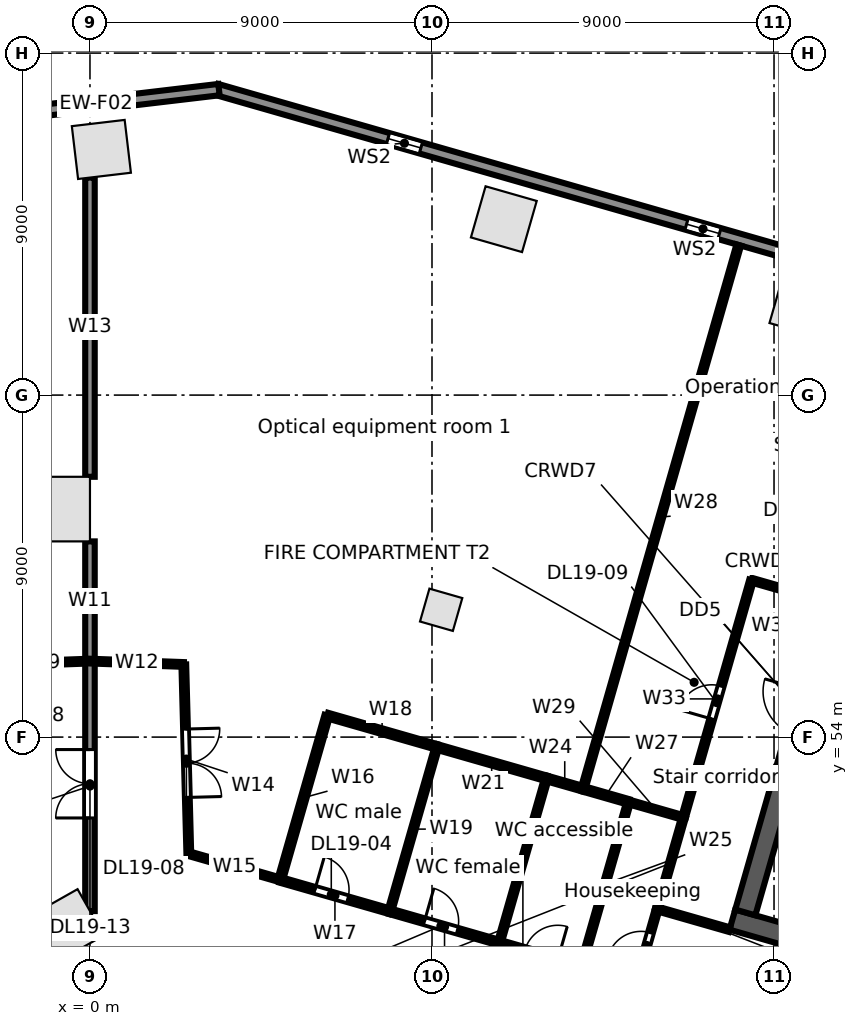
"""IFC4 building model, lengths in metres.
Left out: names, types, materials, properties, quantities, classifications, styles, units other than length and angle.
Written with IfcOpenShell. Run it as: python <this file> out.ifc"""

import sys

from ifc_helpers import new_model, si_unit, direction, frame, frame_2d, origin, origin_2d, place, context, subcontext, project, spatial, rectangle, extrude, element, fill, save


model = new_model("IFC4")
c1 = context("Model", 3, precision=1e-05, world=origin(), true_north=direction((0.0, 1.0)))
c2 = subcontext(c1, "Body", "Model", "MODEL_VIEW")
j1 = project(units=[si_unit("LENGTHUNIT", "METRE"), si_unit("PLANEANGLEUNIT", "RADIAN")], contexts=[c1])
p1 = place(None, origin())
s1 = spatial("IfcSite", under=j1, at=p1, CompositionType="ELEMENT")
p2 = place(p1, origin())
s2 = spatial("IfcBuilding", under=s1, at=p2, CompositionType="ELEMENT")
p3 = place(p2, frame((0.0, 0.0, 97.1)))
s3 = spatial("IfcBuildingStorey", under=s2, at=p3, CompositionType="ELEMENT", Elevation=97.1)
for number, where, z_axis, x_axis in (
    (1, (18.746, 65.376, 0.0), (0.0, 0.0, 1.0), (-0.961, 0.276, 0.0)),
    (2, (10.89, 67.629, 0.0), (0.0, 0.0, 1.0), (-0.961, 0.276, 0.0)),
    (3, (0.3, 69.464, 0.0), (0.0, 0.0, 1.0), (-0.993, -0.118, 0.0)),
    (4, (-0.591, 49.044, 0.0), (0.0, 0.0, 1.0), (0.87, 0.492, 0.0)),
):
    element("IfcColumn", number, at=place(p3, frame(where, z_axis=z_axis, x_axis=x_axis)), inside=s3, PredefinedType="COLUMN", context=c2, shape_type="SweptSolid", body=[
        extrude(rectangle(XDim=1.4, YDim=1.4, at=origin_2d()), origin(), (0.0, 0.0, 1.0), 4.4),
    ])
p4 = place(p3, frame((-0.85, 60.0, 0.0), z_axis=(0.0, 0.0, 1.0), x_axis=(0.0, 1.0, 0.0)))
e5 = element("IfcColumn", 5, at=p4, inside=s3, PredefinedType="COLUMN", context=c2, shape_type="SweptSolid", body=[
    extrude(rectangle(XDim=1.7, YDim=1.7, at=origin_2d()), origin(), (0.0, 0.0, 1.0), 4.4),
])
p5 = place(p3, frame((9.241, 57.35, 0.0), z_axis=(0.0, 0.0, 1.0), x_axis=(0.961261695938, -0.275637355817, 0.0)))
e6 = element("IfcColumn", 6, at=p5, inside=s3, PredefinedType="COLUMN", context=c2, shape_type="SweptSolid", body=[
    extrude(rectangle(XDim=0.9, YDim=0.9, at=origin_2d()), origin(), (0.0, 0.0, 1.0), 4.4),
])
p6 = place(p3, frame((3.335, 71.044, 0.0), z_axis=(0.0, 0.0, 1.0), x_axis=(0.961260130989, -0.275642813387, 0.0)))
e7 = element("IfcWall", 7, at=p6, inside=s3, PredefinedType="STANDARD", context=c2, shape_type="SweptSolid", body=[
    extrude(rectangle(XDim=32.741, YDim=0.3, at=frame_2d((16.371, 0.0))), origin(), (0.0, 0.0, 1.0), 4.08),
])
p7 = place(p6, frame((29.207, 0.0, 0.6)))
e8 = element("IfcOpeningElement", 8, at=p7, cuts=e7, PredefinedType="OPENING", context=c2, shape_type="SweptSolid", body=[
    extrude(rectangle(XDim=0.9, YDim=2.8, at=frame_2d((0.45, 1.4))), frame((0.0, 0.16, 0.0), z_axis=(0.0, -1.0, 0.0), x_axis=(1.0, 0.0, 0.0)), (0.0, 0.0, 1.0), 0.32),
])
p8 = place(p6, frame((21.034, 0.0, 0.6)))
e9 = element("IfcOpeningElement", 9, at=p8, cuts=e7, PredefinedType="OPENING", context=c2, shape_type="SweptSolid", body=[
    extrude(rectangle(XDim=0.9, YDim=2.8, at=frame_2d((0.45, 1.4))), frame((0.0, 0.16, 0.0), z_axis=(0.0, -1.0, 0.0), x_axis=(1.0, 0.0, 0.0)), (0.0, 0.0, 1.0), 0.32),
])
p9 = place(p6, frame((12.861, 0.0, 0.6)))
e10 = element("IfcOpeningElement", 10, at=p9, cuts=e7, PredefinedType="OPENING", context=c2, shape_type="SweptSolid", body=[
    extrude(rectangle(XDim=0.9, YDim=2.8, at=frame_2d((0.45, 1.4))), frame((0.0, 0.16, 0.0), z_axis=(0.0, -1.0, 0.0), x_axis=(1.0, 0.0, 0.0)), (0.0, 0.0, 1.0), 0.32),
])
p10 = place(p6, frame((4.688, 0.0, 0.6)))
e11 = element("IfcOpeningElement", 11, at=p10, cuts=e7, PredefinedType="OPENING", context=c2, shape_type="SweptSolid", body=[
    extrude(rectangle(XDim=0.9, YDim=2.8, at=frame_2d((0.45, 1.4))), frame((0.0, 0.16, 0.0), z_axis=(0.0, -1.0, 0.0), x_axis=(1.0, 0.0, 0.0)), (0.0, 0.0, 1.0), 0.32),
])
p11 = place(p3, frame((-3.076, 70.273, 0.0), z_axis=(0.0, 0.0, 1.0), x_axis=(0.993067743007, 0.117543429416, 0.0)))
e12 = element("IfcWall", 12, at=p11, inside=s3, PredefinedType="STANDARD", context=c2, shape_type="SweptSolid", body=[
    extrude(rectangle(XDim=6.516, YDim=0.3, at=frame_2d((3.258, 0.0))), origin(), (0.0, 0.0, 1.0), 4.08),
])
p12 = place(p3, frame((16.904, 49.197, 0.0), z_axis=(0.0, 0.0, 1.0), x_axis=(0.96126248289, -0.275634611374, 0.0)))
e13 = element("IfcWall", 13, at=p12, inside=s3, PredefinedType="SOLIDWALL", context=c2, shape_type="SweptSolid", body=[
    extrude(rectangle(XDim=9.0, YDim=0.55, at=frame_2d((4.5, 0.0))), origin(), (0.0, 0.0, 1.0), 4.08),
])
p13 = place(p3, frame((17.244, 49.386, 0.0), z_axis=(0.0, 0.0, 1.0), x_axis=(0.275632146085, 0.96126318979, 0.0)))
e14 = element("IfcWall", 14, at=p13, inside=s3, PredefinedType="SOLIDWALL", context=c2, shape_type="SweptSolid", body=[
    extrude(rectangle(XDim=10.9, YDim=0.55, at=frame_2d((5.45, 0.0))), origin(), (0.0, 0.0, 1.0), 4.08),
])
p14 = place(p13, frame((4.85, 0.0, 0.0)))
e15 = element("IfcOpeningElement", 15, at=p14, cuts=e14, PredefinedType="OPENING", context=c2, shape_type="SweptSolid", body=[
    extrude(rectangle(XDim=1.2, YDim=2.1, at=frame_2d((0.6, 1.05))), frame((0.0, 0.285, 0.0), z_axis=(0.0, -1.0, 0.0), x_axis=(1.0, 0.0, 0.0)), (0.0, 0.0, 1.0), 0.57),
])
p15 = place(p3, frame((-2.67, 55.904, 0.0), z_axis=(0.0, 0.0, 1.0), x_axis=(0.999354913865, 0.03591317494, 0.0)))
e16 = element("IfcWall", 16, at=p15, inside=s3, PredefinedType="PARTITIONING", context=c2, shape_type="SweptSolid", body=[
    extrude(rectangle(XDim=2.672, YDim=0.125, at=frame_2d((1.336, 0.0))), origin(), (0.0, 0.0, 1.0), 3.142),
])
p16 = place(p3, frame((0.0, 49.422, 0.0), z_axis=(0.0, 0.0, 1.0), x_axis=(0.0, 1.0, 0.0)))
e17 = element("IfcWall", 17, at=p16, inside=s3, PredefinedType="PARTITIONING", context=c2, shape_type="SweptSolid", body=[
    extrude(rectangle(XDim=6.578, YDim=0.25, at=frame_2d((3.289, 0.0))), origin(), (0.0, 0.0, 1.0), 4.08),
])
p17 = place(p16, frame((2.45, 0.0, 0.0)))
e18 = element("IfcOpeningElement", 18, at=p17, cuts=e17, PredefinedType="OPENING", context=c2, shape_type="SweptSolid", body=[
    extrude(rectangle(XDim=1.8, YDim=2.1, at=frame_2d((0.9, 1.05))), frame((0.0, 0.135, 0.0), z_axis=(0.0, -1.0, 0.0), x_axis=(1.0, 0.0, 0.0)), (0.0, 0.0, 1.0), 0.27),
])
p18 = place(p3, frame((0.0, 56.0, 0.0), z_axis=(0.0, 0.0, 1.0), x_axis=(0.0, 1.0, 0.0)))
e19 = element("IfcWall", 19, at=p18, inside=s3, PredefinedType="PARTITIONING", context=c2, shape_type="SweptSolid", body=[
    extrude(rectangle(XDim=3.15, YDim=0.25, at=frame_2d((1.575, 0.0))), origin(), (0.0, 0.0, 1.0), 4.08),
])
p19 = place(p3, frame((0.0, 56.0, 0.0), z_axis=(0.0, 0.0, 1.0), x_axis=(0.999349313684, -0.036068673934, 0.0)))
e20 = element("IfcWall", 20, at=p19, inside=s3, PredefinedType="PARTITIONING", context=c2, shape_type="SweptSolid", body=[
    extrude(rectangle(XDim=2.471, YDim=0.125, at=frame_2d((1.235, 0.0))), origin(), (0.0, 0.0, 1.0), 4.08),
])
p20 = place(p3, frame((0.0, 60.85, 0.0), z_axis=(0.0, 0.0, 1.0), x_axis=(0.0, 1.0, 0.0)))
e21 = element("IfcWall", 21, at=p20, inside=s3, PredefinedType="PARTITIONING", context=c2, shape_type="SweptSolid", body=[
    extrude(rectangle(XDim=7.874, YDim=0.25, at=frame_2d((3.937, 0.0))), origin(), (0.0, 0.0, 1.0), 3.352),
])
p21 = place(p3, frame((2.469, 55.911, 0.0), z_axis=(0.0, 0.0, 1.0), x_axis=(0.02651808123, -0.999648333849, 0.0)))
e22 = element("IfcWall", 22, at=p21, inside=s3, PredefinedType="PARTITIONING", context=c2, shape_type="SweptSolid", body=[
    extrude(rectangle(XDim=4.981, YDim=0.125, at=frame_2d((2.49, 0.0))), origin(), (0.0, 0.0, 1.0), 4.08),
])
p22 = place(p21, frame((1.7, 0.0, 0.0)))
e23 = element("IfcOpeningElement", 23, at=p22, cuts=e22, PredefinedType="OPENING", context=c2, shape_type="SweptSolid", body=[
    extrude(rectangle(XDim=1.8, YDim=2.1, at=frame_2d((0.9, 1.05))), frame((0.0, 0.073, 0.0), z_axis=(0.0, -1.0, 0.0), x_axis=(1.0, 0.0, 0.0)), (0.0, 0.0, 1.0), 0.145),
])
p23 = place(p3, frame((2.601, 50.932, 0.0), z_axis=(0.0, 0.0, 1.0), x_axis=(0.961265528111, -0.275623991092, 0.0)))
e24 = element("IfcWall", 24, at=p23, inside=s3, PredefinedType="PARTITIONING", context=c2, shape_type="SweptSolid", body=[
    extrude(rectangle(XDim=2.5, YDim=0.125, at=frame_2d((1.25, 0.0))), origin(), (0.0, 0.0, 1.0), 4.08),
])
p24 = place(p3, frame((5.004, 50.243, 0.0), z_axis=(0.0, 0.0, 1.0), x_axis=(0.275838825927, 0.961203902464, 0.0)))
e25 = element("IfcWall", 25, at=p24, inside=s3, PredefinedType="PARTITIONING", context=c2, shape_type="SweptSolid", body=[
    extrude(rectangle(XDim=4.5, YDim=0.15, at=frame_2d((2.25, 0.0))), origin(), (0.0, 0.0, 1.0), 4.08),
])
p25 = place(p3, frame((5.004, 50.243, 0.0), z_axis=(0.0, 0.0, 1.0), x_axis=(0.961268664977, -0.27561305073, 0.0)))
e26 = element("IfcWall", 26, at=p25, inside=s3, PredefinedType="PARTITIONING", context=c2, shape_type="SweptSolid", body=[
    extrude(rectangle(XDim=3.0, YDim=0.15, at=frame_2d((1.5, 0.0))), origin(), (0.0, 0.0, 1.0), 4.08),
])
p26 = place(p25, frame((0.95, 0.0, 0.0)))
e27 = element("IfcOpeningElement", 27, at=p26, cuts=e26, PredefinedType="OPENING", context=c2, shape_type="SweptSolid", body=[
    extrude(rectangle(XDim=0.9, YDim=2.1, at=frame_2d((0.45, 1.05))), frame((0.0, 0.085, 0.0), z_axis=(0.0, -1.0, 0.0), x_axis=(1.0, 0.0, 0.0)), (0.0, 0.0, 1.0), 0.17),
])
p27 = place(p3, frame((6.245, 54.568, 0.0), z_axis=(0.0, 0.0, 1.0), x_axis=(0.961240918172, -0.275709806194, 0.0)))
e28 = element("IfcWall", 28, at=p27, inside=s3, PredefinedType="PARTITIONING", context=c2, shape_type="SweptSolid", body=[
    extrude(rectangle(XDim=3.0, YDim=0.15, at=frame_2d((1.5, 0.0))), origin(), (0.0, 0.0, 1.0), 3.16),
])
p28 = place(p3, frame((7.888, 49.416, 0.0), z_axis=(0.0, 0.0, 1.0), x_axis=(0.275803080638, 0.96121415965, 0.0)))
e29 = element("IfcWall", 29, at=p28, inside=s3, PredefinedType="PARTITIONING", context=c2, shape_type="SweptSolid", body=[
    extrude(rectangle(XDim=4.5, YDim=0.125, at=frame_2d((2.25, 0.0))), origin(), (0.0, 0.0, 1.0), 3.16),
])
p29 = place(p3, frame((7.888, 49.416, 0.0), z_axis=(0.0, 0.0, 1.0), x_axis=(0.961268664977, -0.27561305073, 0.0)))
e30 = element("IfcWall", 30, at=p29, inside=s3, PredefinedType="PARTITIONING", context=c2, shape_type="SweptSolid", body=[
    extrude(rectangle(XDim=3.0, YDim=0.15, at=frame_2d((1.5, 0.0))), origin(), (0.0, 0.0, 1.0), 3.142),
])
p30 = place(p29, frame((0.95, 0.0, 0.0)))
e31 = element("IfcOpeningElement", 31, at=p30, cuts=e30, PredefinedType="OPENING", context=c2, shape_type="SweptSolid", body=[
    extrude(rectangle(XDim=0.9, YDim=2.1, at=frame_2d((0.45, 1.05))), frame((0.0, 0.085, 0.0), z_axis=(0.0, -1.0, 0.0), x_axis=(1.0, 0.0, 0.0)), (0.0, 0.0, 1.0), 0.17),
])
p31 = place(p3, frame((9.129, 53.741, 0.0), z_axis=(0.0, 0.0, 1.0), x_axis=(0.961243927922, -0.275699312717, 0.0)))
e32 = element("IfcWall", 32, at=p31, inside=s3, PredefinedType="PARTITIONING", context=c2, shape_type="SweptSolid", body=[
    extrude(rectangle(XDim=2.999, YDim=0.15, at=frame_2d((1.5, 0.0))), origin(), (0.0, 0.0, 1.0), 3.142),
])
p32 = place(p3, frame((10.772, 48.589, 0.0), z_axis=(0.0, 0.0, 1.0), x_axis=(0.275602532653, 0.961271680637, 0.0)))
e33 = element("IfcWall", 33, at=p32, inside=s3, PredefinedType="PARTITIONING", context=c2, shape_type="SweptSolid", body=[
    extrude(rectangle(XDim=4.499, YDim=0.125, at=frame_2d((2.25, 0.0))), origin(), (0.0, 0.0, 1.0), 4.08),
])
p33 = place(p3, frame((10.772, 48.589, 0.0), z_axis=(0.0, 0.0, 1.0), x_axis=(0.96127791106, -0.275580800688, 0.0)))
e34 = element("IfcWall", 34, at=p33, inside=s3, PredefinedType="PARTITIONING", context=c2, shape_type="SweptSolid", body=[
    extrude(rectangle(XDim=2.25, YDim=0.15, at=frame_2d((1.125, 0.0))), origin(), (0.0, 0.0, 1.0), 4.08),
])
p34 = place(p33, frame((0.7, 0.0, 0.0)))
e35 = element("IfcOpeningElement", 35, at=p34, cuts=e34, PredefinedType="OPENING", context=c2, shape_type="SweptSolid", body=[
    extrude(rectangle(XDim=0.9, YDim=2.1, at=frame_2d((0.45, 1.05))), frame((0.0, 0.085, 0.0), z_axis=(0.0, -1.0, 0.0), x_axis=(1.0, 0.0, 0.0)), (0.0, 0.0, 1.0), 0.17),
])
p35 = place(p3, frame((12.012, 52.914, 0.0), z_axis=(0.0, 0.0, 1.0), x_axis=(0.961459478043, -0.274946671341, 0.0)))
e36 = element("IfcWall", 36, at=p35, inside=s3, PredefinedType="PARTITIONING", context=c2, shape_type="SweptSolid", body=[
    extrude(rectangle(XDim=1.001, YDim=0.15, at=frame_2d((0.5, 0.0))), origin(), (0.0, 0.0, 1.0), 4.08),
])
p36 = place(p3, frame((12.935, 47.969, 0.0), z_axis=(0.0, 0.0, 1.0), x_axis=(0.275602532653, 0.961271680637, 0.0)))
e37 = element("IfcWall", 37, at=p36, inside=s3, PredefinedType="PARTITIONING", context=c2, shape_type="SweptSolid", body=[
    extrude(rectangle(XDim=4.499, YDim=0.125, at=frame_2d((2.25, 0.0))), origin(), (0.0, 0.0, 1.0), 4.08),
])
p37 = place(p3, frame((12.974, 52.639, 0.0), z_axis=(0.0, 0.0, 1.0), x_axis=(0.961132191281, -0.276088592454, 0.0)))
e38 = element("IfcWall", 38, at=p37, inside=s3, PredefinedType="PARTITIONING", context=c2, shape_type="SweptSolid", body=[
    extrude(rectangle(XDim=1.25, YDim=0.15, at=frame_2d((0.625, 0.0))), origin(), (0.0, 0.0, 1.0), 4.08),
])
p38 = place(p3, frame((12.974, 52.639, 0.0), z_axis=(0.0, 0.0, 1.0), x_axis=(0.275299463768, 0.961358520662, 0.0)))
e39 = element("IfcWall", 39, at=p38, inside=s3, PredefinedType="PARTITIONING", context=c2, shape_type="SweptSolid", body=[
    extrude(rectangle(XDim=14.885, YDim=0.125, at=frame_2d((7.443, 0.0))), origin(), (0.0, 0.0, 1.0), 3.142),
])
p39 = place(p3, frame((14.175, 52.294, 0.0), z_axis=(0.0, 0.0, 1.0), x_axis=(0.961370232732, -0.275258561387, 0.0)))
e40 = element("IfcWall", 40, at=p39, inside=s3, PredefinedType="PARTITIONING", context=c2, shape_type="SweptSolid", body=[
    extrude(rectangle(XDim=1.5, YDim=0.125, at=frame_2d((0.75, 0.0))), origin(), (0.0, 0.0, 1.0), 4.08),
])
p40 = place(p3, frame((14.377, 47.555, 0.0), z_axis=(0.0, 0.0, 1.0), x_axis=(0.275446387355, 0.961316434736, 0.0)))
e41 = element("IfcWall", 41, at=p40, inside=s3, PredefinedType="PARTITIONING", context=c2, shape_type="SweptSolid", body=[
    extrude(rectangle(XDim=2.0, YDim=0.125, at=frame_2d((1.0, 0.0))), origin(), (0.0, 0.0, 1.0), 4.08),
])
p41 = place(p40, frame((0.45, 0.0, 0.0)))
e42 = element("IfcOpeningElement", 42, at=p41, cuts=e41, PredefinedType="OPENING", context=c2, shape_type="SweptSolid", body=[
    extrude(rectangle(XDim=0.9, YDim=2.1, at=frame_2d((0.45, 1.05))), frame((0.0, 0.073, 0.0), z_axis=(0.0, -1.0, 0.0), x_axis=(1.0, 0.0, 0.0)), (0.0, 0.0, 1.0), 0.145),
])
p42 = place(p3, frame((14.928, 49.478, 0.0), z_axis=(0.0, 0.0, 1.0), x_axis=(0.275598116036, 0.961272946898, 0.0)))
e43 = element("IfcWall", 43, at=p42, inside=s3, PredefinedType="PARTITIONING", context=c2, shape_type="SweptSolid", body=[
    extrude(rectangle(XDim=2.5, YDim=0.125, at=frame_2d((1.25, 0.0))), origin(), (0.0, 0.0, 1.0), 4.08),
])
p43 = place(p3, frame((14.928, 49.478, 0.0), z_axis=(0.0, 0.0, 1.0), x_axis=(0.961243778232, -0.27569983462, 0.0)))
e44 = element("IfcWall", 44, at=p43, inside=s3, PredefinedType="PARTITIONING", context=c2, shape_type="SweptSolid", body=[
    extrude(rectangle(XDim=1.977, YDim=0.125, at=frame_2d((0.988, 0.0))), origin(), (0.0, 0.0, 1.0), 4.08),
])
p44 = place(p3, frame((15.617, 51.881, 0.0), z_axis=(0.0, 0.0, 1.0), x_axis=(0.275703259795, 0.961242795832, 0.0)))
e45 = element("IfcWall", 45, at=p44, inside=s3, PredefinedType="PARTITIONING", context=c2, shape_type="SweptSolid", body=[
    extrude(rectangle(XDim=6.5, YDim=0.125, at=frame_2d((3.25, 0.0))), origin(), (0.0, 0.0, 1.0), 3.142),
])
p45 = place(p44, frame((2.7, 0.0, 0.0)))
e46 = element("IfcOpeningElement", 46, at=p45, cuts=e45, PredefinedType="OPENING", context=c2, shape_type="SweptSolid", body=[
    extrude(rectangle(XDim=0.9, YDim=2.1, at=frame_2d((0.45, 1.05))), frame((0.0, 0.073, 0.0), z_axis=(0.0, -1.0, 0.0), x_axis=(1.0, 0.0, 0.0)), (0.0, 0.0, 1.0), 0.145),
])
p46 = place(p3, frame((17.409, 58.129, 0.0), z_axis=(0.0, 0.0, 1.0), x_axis=(0.961253165474, -0.275667103345, 0.0)))
e47 = element("IfcWall", 47, at=p46, inside=s3, PredefinedType="PARTITIONING", context=c2, shape_type="SweptSolid", body=[
    extrude(rectangle(XDim=1.977, YDim=0.125, at=frame_2d((0.988, 0.0))), origin(), (0.0, 0.0, 1.0), 4.08),
])
p47 = place(p9, origin())
e48 = element("IfcWindow", 48, at=p47, inside=s3, PartitioningType="SINGLE_PANEL", PredefinedType="WINDOW", context=c2, shape_type="SweptSolid", body=[
    extrude(rectangle(XDim=0.9, YDim=2.8, at=frame_2d((0.45, 1.4))), frame((0.0, 0.03, 0.0), z_axis=(0.0, -1.0, 0.0), x_axis=(1.0, 0.0, 0.0)), (0.0, 0.0, 1.0), 0.06),
])
fill(e10, e48)
p48 = place(p10, origin())
e49 = element("IfcWindow", 49, at=p48, inside=s3, PartitioningType="SINGLE_PANEL", PredefinedType="WINDOW", context=c2, shape_type="SweptSolid", body=[
    extrude(rectangle(XDim=0.9, YDim=2.8, at=frame_2d((0.45, 1.4))), frame((0.0, 0.03, 0.0), z_axis=(0.0, -1.0, 0.0), x_axis=(1.0, 0.0, 0.0)), (0.0, 0.0, 1.0), 0.06),
])
fill(e11, e49)
p49 = place(p26, origin())
e50 = element("IfcDoor", 50, at=p49, inside=s3, OperationType="SINGLE_SWING_LEFT", PredefinedType="DOOR", context=c2, shape_type="SweptSolid", body=[
    extrude(rectangle(XDim=0.9, YDim=2.1, at=frame_2d((0.45, 1.05))), frame((0.0, 0.025, 0.0), z_axis=(0.0, -1.0, 0.0), x_axis=(1.0, 0.0, 0.0)), (0.0, 0.0, 1.0), 0.05),
])
fill(e27, e50)
p50 = place(p30, origin())
e51 = element("IfcDoor", 51, at=p50, inside=s3, OperationType="SINGLE_SWING_LEFT", PredefinedType="DOOR", context=c2, shape_type="SweptSolid", body=[
    extrude(rectangle(XDim=0.9, YDim=2.1, at=frame_2d((0.45, 1.05))), frame((0.0, 0.025, 0.0), z_axis=(0.0, -1.0, 0.0), x_axis=(1.0, 0.0, 0.0)), (0.0, 0.0, 1.0), 0.05),
])
fill(e31, e51)
p51 = place(p41, origin())
e52 = element("IfcDoor", 52, at=p51, inside=s3, OperationType="SINGLE_SWING_LEFT", PredefinedType="DOOR", context=c2, shape_type="SweptSolid", body=[
    extrude(rectangle(XDim=0.9, YDim=2.1, at=frame_2d((0.45, 1.05))), frame((0.0, 0.025, 0.0), z_axis=(0.0, -1.0, 0.0), x_axis=(1.0, 0.0, 0.0)), (0.0, 0.0, 1.0), 0.05),
])
fill(e42, e52)
p52 = place(p22, origin())
e53 = element("IfcDoor", 53, at=p52, inside=s3, OperationType="DOUBLE_DOOR_SINGLE_SWING", PredefinedType="DOOR", context=c2, shape_type="SweptSolid", body=[
    extrude(rectangle(XDim=1.8, YDim=2.1, at=frame_2d((0.9, 1.05))), frame((0.0, 0.025, 0.0), z_axis=(0.0, -1.0, 0.0), x_axis=(1.0, 0.0, 0.0)), (0.0, 0.0, 1.0), 0.05),
])
fill(e23, e53)
p53 = place(p45, origin())
e54 = element("IfcDoor", 54, at=p53, inside=s3, OperationType="SINGLE_SWING_LEFT", PredefinedType="DOOR", context=c2, shape_type="SweptSolid", body=[
    extrude(rectangle(XDim=0.9, YDim=2.1, at=frame_2d((0.45, 1.05))), frame((0.0, 0.025, 0.0), z_axis=(0.0, -1.0, 0.0), x_axis=(1.0, 0.0, 0.0)), (0.0, 0.0, 1.0), 0.05),
])
fill(e46, e54)
p54 = place(p17, origin())
e55 = element("IfcDoor", 55, at=p54, inside=s3, OperationType="DOUBLE_DOOR_SINGLE_SWING", PredefinedType="DOOR", context=c2, shape_type="SweptSolid", body=[
    extrude(rectangle(XDim=1.8, YDim=2.1, at=frame_2d((0.9, 1.05))), frame((0.0, 0.025, 0.0), z_axis=(0.0, -1.0, 0.0), x_axis=(1.0, 0.0, 0.0)), (0.0, 0.0, 1.0), 0.05),
])
fill(e18, e55)
save(model, sys.argv[1])
